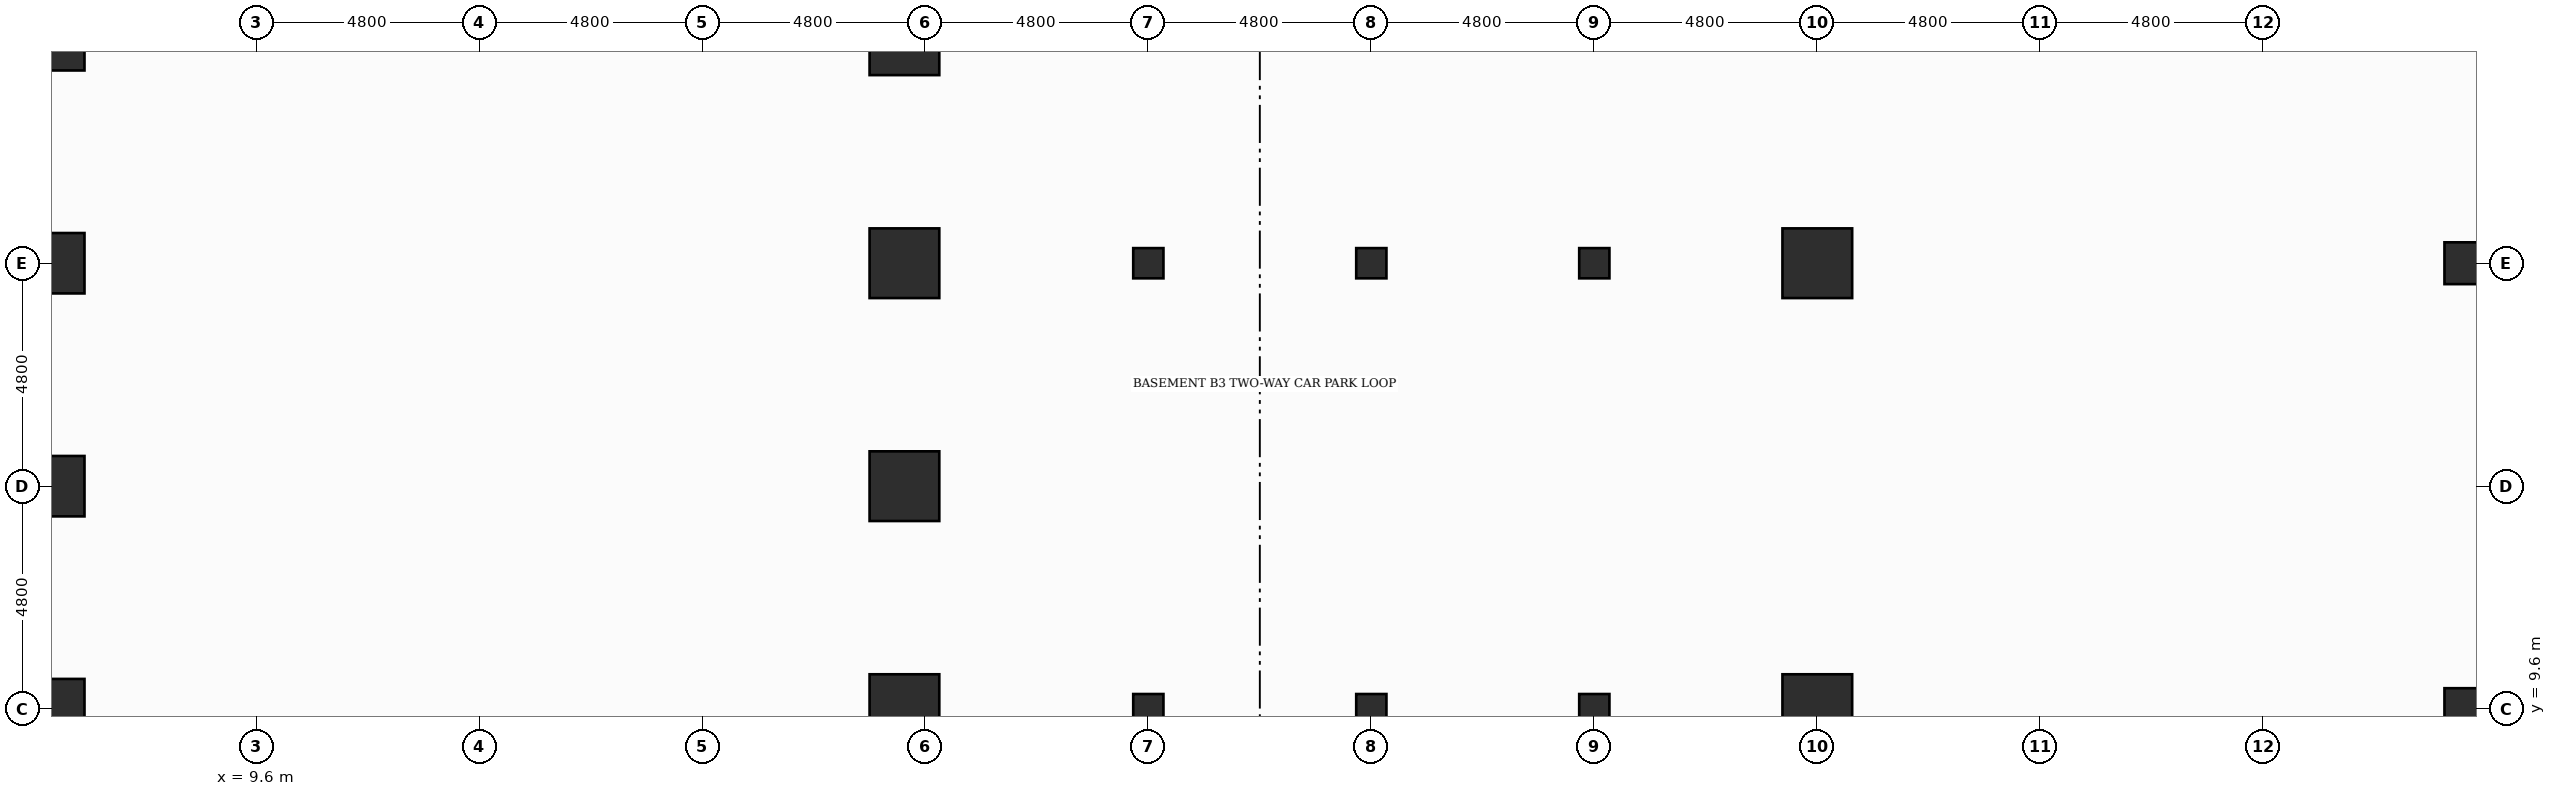
"""IFC4 building model, lengths in metres.
Left out: names, types, materials, properties, quantities, classifications, styles, units other than length and angle.
Written with IfcOpenShell. Run it as: python <this file> out.ifc"""

import sys

from ifc_helpers import new_model, si_unit, direction, frame, origin, origin_2d, place, context, subcontext, project, spatial, rectangle, circle, extrude, element, save


model = new_model("IFC4")
c1 = context("Model", 3, precision=1e-05, world=origin(), true_north=direction((0.0, 1.0)))
c2 = subcontext(c1, "Body", "Model", "MODEL_VIEW")
j1 = project(units=[si_unit("LENGTHUNIT", "METRE"), si_unit("PLANEANGLEUNIT", "RADIAN")], contexts=[c1])
p1 = place(None, origin())
s1 = spatial("IfcSite", under=j1, at=p1, CompositionType="ELEMENT")
p2 = place(p1, origin())
s2 = spatial("IfcBuilding", under=s1, at=p2, CompositionType="ELEMENT")
p3 = place(p2, frame((0.0, 0.0, -13.2)))
s3 = spatial("IfcBuildingStorey", under=s2, at=p3, CompositionType="ELEMENT", Elevation=-13.2)
for number, where, z_axis, x_axis in (
    (1, (5.25, 9.6, 0.0), (0.0, 0.0, 1.0), (1.0, 0.0, 0.0)),
    (2, (5.25, 14.4, 0.0), (0.0, 0.0, 1.0), (1.0, 0.0, 0.0)),
    (3, (5.25, 19.2, 0.0), (0.0, 0.0, 1.0), (1.0, 0.0, 0.0)),
    (4, (5.25, 24.0, 0.0), (0.0, 0.0, 1.0), (1.0, 0.0, 0.0)),
):
    element("IfcColumn", number, at=place(p3, frame(where, z_axis=z_axis, x_axis=x_axis)), inside=s3, PredefinedType="COLUMN", context=c2, shape_type="SweptSolid", body=[
        extrude(rectangle(XDim=1.3, YDim=1.3, at=origin_2d()), origin(), (0.0, 0.0, 1.0), 4.4),
    ])
for number, where, z_axis, x_axis in (
    (5, (23.55, 9.6, 0.0), (0.0, 0.0, 1.0), (1.0, 0.0, 0.0)),
    (6, (23.55, 14.4, 0.0), (0.0, 0.0, 1.0), (1.0, 0.0, 0.0)),
    (7, (23.55, 19.2, 0.0), (0.0, 0.0, 1.0), (1.0, 0.0, 0.0)),
    (8, (23.55, 24.0, 0.0), (0.0, 0.0, 1.0), (1.0, 0.0, 0.0)),
):
    element("IfcColumn", number, at=place(p3, frame(where, z_axis=z_axis, x_axis=x_axis)), inside=s3, PredefinedType="USERDEFINED", context=c2, shape_type="SweptSolid", body=[
        extrude(rectangle(XDim=1.5, YDim=1.5, at=origin_2d()), origin(), (0.0, 0.0, 1.0), 4.4),
    ])
for number, where, z_axis, x_axis in (
    (9, (28.8, 9.6, 0.0), (0.0, 0.0, 1.0), (1.0, 0.0, 0.0)),
    (10, (28.8, 19.2, 0.0), (0.0, 0.0, 1.0), (1.0, 0.0, 0.0)),
    (11, (33.6, 9.6, 0.0), (0.0, 0.0, 1.0), (1.0, 0.0, 0.0)),
    (12, (33.6, 19.2, 0.0), (0.0, 0.0, 1.0), (1.0, 0.0, 0.0)),
    (13, (38.4, 9.6, 0.0), (0.0, 0.0, 1.0), (1.0, 0.0, 0.0)),
    (14, (38.4, 19.2, 0.0), (0.0, 0.0, 1.0), (1.0, 0.0, 0.0)),
):
    element("IfcColumn", number, at=place(p3, frame(where, z_axis=z_axis, x_axis=x_axis)), inside=s3, PredefinedType="PILASTER", context=c2, shape_type="SweptSolid", body=[
        extrude(rectangle(XDim=0.65, YDim=0.65, at=origin_2d()), origin(), (0.0, 0.0, 1.0), 4.4),
    ])
for number, where, z_axis, x_axis in (
    (15, (43.2, 9.6, 0.0), (0.0, 0.0, 1.0), (1.0, 0.0, 0.0)),
    (16, (43.2, 19.2, 0.0), (0.0, 0.0, 1.0), (1.0, 0.0, 0.0)),
):
    element("IfcColumn", number, at=place(p3, frame(where, z_axis=z_axis, x_axis=x_axis)), inside=s3, PredefinedType="USERDEFINED", context=c2, shape_type="SweptSolid", body=[
        extrude(rectangle(XDim=1.5, YDim=1.5, at=origin_2d()), origin(), (0.0, 0.0, 1.0), 4.4),
    ])
for number, where, z_axis, x_axis in (
    (17, (57.15, 9.6, 0.0), (0.0, 0.0, 1.0), (1.0, 0.0, 0.0)),
    (18, (57.15, 19.2, 0.0), (0.0, 0.0, 1.0), (1.0, 0.0, 0.0)),
):
    element("IfcColumn", number, at=place(p3, frame(where, z_axis=z_axis, x_axis=x_axis)), inside=s3, PredefinedType="COLUMN", context=c2, shape_type="SweptSolid", body=[
        extrude(circle(Radius=0.45, at=origin_2d()), origin(), (0.0, 0.0, 1.0), 4.4),
    ])
save(model, sys.argv[1])
